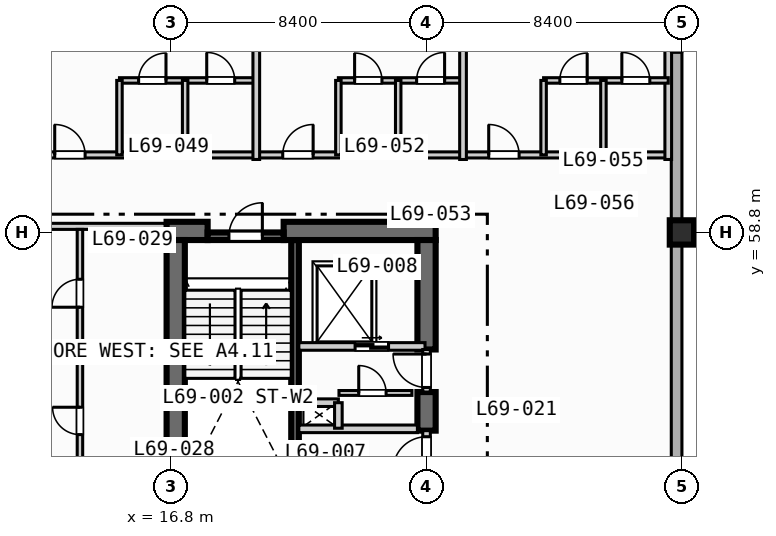
"""IFC4 building model, lengths in metres.
Left out: names, types, materials, properties, quantities, classifications, styles, units other than length and angle.
Written with IfcOpenShell. Run it as: python <this file> out.ifc"""

import sys

from ifc_helpers import new_model, si_unit, direction, frame, frame_2d, origin, origin_2d, place, context, subcontext, project, spatial, rectangle, extrude, element, fill, save


model = new_model("IFC4")
c1 = context("Model", 3, precision=1e-05, world=origin(), true_north=direction((0.0, 1.0)))
c2 = subcontext(c1, "Body", "Model", "MODEL_VIEW")
j1 = project(units=[si_unit("LENGTHUNIT", "METRE"), si_unit("PLANEANGLEUNIT", "RADIAN")], contexts=[c1])
p1 = place(None, origin())
s1 = spatial("IfcSite", under=j1, at=p1, CompositionType="ELEMENT")
p2 = place(p1, origin())
s2 = spatial("IfcBuilding", under=s1, at=p2, CompositionType="ELEMENT")
p3 = place(p2, frame((0.0, 0.0, 278.6)))
s3 = spatial("IfcBuildingStorey", under=s2, at=p3, CompositionType="ELEMENT", Elevation=278.6)
p4 = place(p3, frame((20.875, 50.5, 0.0), z_axis=(0.0, 0.0, 1.0), x_axis=(0.0, 1.0, 0.0)))
e1 = element("IfcWall", 1, at=p4, inside=s3, PredefinedType="SOLIDWALL", context=c2, shape_type="SweptSolid", body=[
    extrude(rectangle(XDim=8.05, YDim=0.25, at=frame_2d((4.025, 0.0))), origin(), (0.0, 0.0, 1.0), 3.47),
])
p5 = place(p3, frame((16.65, 58.85, 0.0), z_axis=(0.0, 0.0, 1.0), x_axis=(1.0, 0.0, 0.0)))
e2 = element("IfcWall", 2, at=p5, inside=s3, PredefinedType="SHEAR", context=c2, shape_type="SweptSolid", body=[
    extrude(rectangle(XDim=1.35, YDim=0.6, at=frame_2d((0.675, 0.0))), origin(), (0.0, 0.0, 1.0), 3.47),
])
p6 = place(p3, frame((20.5, 58.85, 0.0), z_axis=(0.0, 0.0, 1.0), x_axis=(1.0, 0.0, 0.0)))
e3 = element("IfcWall", 3, at=p6, inside=s3, PredefinedType="SHEAR", context=c2, shape_type="SweptSolid", body=[
    extrude(rectangle(XDim=5.0, YDim=0.6, at=frame_2d((2.5, 0.0))), origin(), (0.0, 0.0, 1.0), 3.47),
])
p7 = place(p3, frame((16.95, 42.2, 0.0), z_axis=(0.0, 0.0, 1.0), x_axis=(0.0, 1.0, 0.0)))
e4 = element("IfcWall", 4, at=p7, inside=s3, PredefinedType="SHEAR", context=c2, shape_type="SweptSolid", body=[
    extrude(rectangle(XDim=16.35, YDim=0.6, at=frame_2d((8.175, 0.0))), origin(), (0.0, 0.0, 1.0), 3.47),
])
p8 = place(p3, frame((25.2, 52.28, 0.0), z_axis=(0.0, 0.0, 1.0), x_axis=(0.0, 1.0, 0.0)))
e5 = element("IfcWall", 5, at=p8, inside=s3, PredefinedType="SHEAR", context=c2, shape_type="SweptSolid", body=[
    extrude(rectangle(XDim=1.27, YDim=0.6, at=frame_2d((0.635, 0.0))), origin(), (0.0, 0.0, 1.0), 3.47),
])
p9 = place(p3, frame((25.2, 54.95, 0.0), z_axis=(0.0, 0.0, 1.0), x_axis=(0.0, 1.0, 0.0)))
e6 = element("IfcWall", 6, at=p9, inside=s3, PredefinedType="SHEAR", context=c2, shape_type="SweptSolid", body=[
    extrude(rectangle(XDim=3.6, YDim=0.6, at=frame_2d((1.8, 0.0))), origin(), (0.0, 0.0, 1.0), 3.47),
])
p10 = place(p3, frame((33.6, 58.8, 0.0), z_axis=(0.0, 0.0, 1.0), x_axis=(1.0, 0.0, 0.0)))
e7 = element("IfcColumn", 7, at=p10, inside=s3, PredefinedType="COLUMN", context=c2, shape_type="SweptSolid", body=[
    extrude(rectangle(XDim=0.8, YDim=0.8, at=origin_2d()), origin(), (0.0, 0.0, 1.0), 3.7),
])
p11 = place(p3, frame((33.425, 72.425, 0.0), z_axis=(0.0, 0.0, 1.0), x_axis=(0.0, -1.0, 0.0)))
e8 = element("IfcWall", 8, at=p11, inside=s3, PredefinedType="STANDARD", context=c2, shape_type="SweptSolid", body=[
    extrude(rectangle(XDim=39.0, YDim=0.35, at=frame_2d((19.5, 0.0))), origin(), (0.0, 0.0, 1.0), 3.47),
])
p12 = place(p11, frame((5.9, 0.0, 0.85)))
e9 = element("IfcOpeningElement", 9, at=p12, cuts=e8, PredefinedType="OPENING", context=c2, shape_type="SweptSolid", body=[
    extrude(rectangle(XDim=1.8, YDim=1.8, at=frame_2d((0.9, 0.9))), frame((0.0, 0.185, 0.0), z_axis=(0.0, -1.0, 0.0), x_axis=(1.0, 0.0, 0.0)), (0.0, 0.0, 1.0), 0.37),
])
p13 = place(p3, frame((18.0, 58.675, 0.0), z_axis=(0.0, 0.0, 1.0), x_axis=(1.0, 0.0, 0.0)))
e10 = element("IfcWall", 10, at=p13, inside=s3, PredefinedType="SOLIDWALL", context=c2, shape_type="SweptSolid", body=[
    extrude(rectangle(XDim=2.5, YDim=0.25, at=frame_2d((1.25, 0.0))), origin(), (0.0, 0.0, 1.0), 3.47),
])
p14 = place(p13, frame((0.7, 0.0, 0.0)))
e11 = element("IfcOpeningElement", 11, at=p14, cuts=e10, PredefinedType="OPENING", context=c2, shape_type="SweptSolid", body=[
    extrude(rectangle(XDim=1.1, YDim=2.15, at=frame_2d((0.55, 1.075))), frame((0.0, 0.135, 0.0), z_axis=(0.0, -1.0, 0.0), x_axis=(1.0, 0.0, 0.0)), (0.0, 0.0, 1.0), 0.27),
])
p15 = place(p3, frame((25.2, 50.8, 0.0), z_axis=(0.0, 0.0, 1.0), x_axis=(0.0, 1.0, 0.0)))
e12 = element("IfcWall", 12, at=p15, inside=s3, PredefinedType="SOLIDWALL", context=c2, shape_type="SweptSolid", body=[
    extrude(rectangle(XDim=1.48, YDim=0.25, at=frame_2d((0.74, 0.0))), origin(), (0.0, 0.0, 1.0), 3.47),
])
p16 = place(p15, frame((0.18, 0.0, 0.0)))
e13 = element("IfcOpeningElement", 13, at=p16, cuts=e12, PredefinedType="OPENING", context=c2, shape_type="SweptSolid", body=[
    extrude(rectangle(XDim=1.1, YDim=2.15, at=frame_2d((0.55, 1.075))), frame((0.0, 0.135, 0.0), z_axis=(0.0, -1.0, 0.0), x_axis=(1.0, 0.0, 0.0)), (0.0, 0.0, 1.0), 0.27),
])
p17 = place(p3, frame((21.0, 52.34, 0.0), z_axis=(0.0, 0.0, 1.0), x_axis=(1.0, 0.0, 0.0)))
e14 = element("IfcWall", 14, at=p17, inside=s3, PredefinedType="SOLIDWALL", context=c2, shape_type="SweptSolid", body=[
    extrude(rectangle(XDim=3.9, YDim=0.25, at=frame_2d((1.95, 0.0))), origin(), (0.0, 0.0, 1.0), 3.47),
])
p18 = place(p3, frame((21.0, 55.05, 0.0), z_axis=(0.0, 0.0, 1.0), x_axis=(1.0, 0.0, 0.0)))
e15 = element("IfcWall", 15, at=p18, inside=s3, PredefinedType="SOLIDWALL", context=c2, shape_type="SweptSolid", body=[
    extrude(rectangle(XDim=4.15, YDim=0.25, at=frame_2d((2.075, 0.0))), origin(), (0.0, 0.0, 1.0), 3.47),
])
p19 = place(p18, frame((1.85, 0.0, 0.0)))
e16 = element("IfcOpeningElement", 16, at=p19, cuts=e15, PredefinedType="OPENING", context=c2, shape_type="SweptSolid", body=[
    extrude(rectangle(XDim=1.1, YDim=2.15, at=frame_2d((0.55, 1.075))), frame((0.0, 0.135, 0.0), z_axis=(0.0, -1.0, 0.0), x_axis=(1.0, 0.0, 0.0)), (0.0, 0.0, 1.0), 0.27),
])
p20 = place(p3, frame((25.2, 53.55, 0.0), z_axis=(0.0, 0.0, 1.0), x_axis=(0.0, 1.0, 0.0)))
e17 = element("IfcWall", 17, at=p20, inside=s3, PredefinedType="SOLIDWALL", context=c2, shape_type="SweptSolid", body=[
    extrude(rectangle(XDim=1.4, YDim=0.25, at=frame_2d((0.7, 0.0))), origin(), (0.0, 0.0, 1.0), 3.47),
])
p21 = place(p20, frame((0.15, 0.0, 0.0)))
e18 = element("IfcOpeningElement", 18, at=p21, cuts=e17, PredefinedType="OPENING", context=c2, shape_type="SweptSolid", body=[
    extrude(rectangle(XDim=1.1, YDim=2.15, at=frame_2d((0.55, 1.075))), frame((0.0, 0.135, 0.0), z_axis=(0.0, -1.0, 0.0), x_axis=(1.0, 0.0, 0.0)), (0.0, 0.0, 1.0), 0.27),
])
p22 = place(p3, frame((21.0, 53.2, 0.0), z_axis=(0.0, 0.0, 1.0), x_axis=(1.0, 0.0, 0.0)))
e19 = element("IfcWall", 19, at=p22, inside=s3, PredefinedType="SOLIDWALL", context=c2, shape_type="SweptSolid", body=[
    extrude(rectangle(XDim=1.3, YDim=0.25, at=frame_2d((0.65, 0.0))), origin(), (0.0, 0.0, 1.0), 3.47),
])
p23 = place(p3, frame((22.3, 52.36, 0.0), z_axis=(0.0, 0.0, 1.0), x_axis=(0.0, 1.0, 0.0)))
e20 = element("IfcWall", 20, at=p23, inside=s3, PredefinedType="SOLIDWALL", context=c2, shape_type="SweptSolid", body=[
    extrude(rectangle(XDim=0.84, YDim=0.25, at=frame_2d((0.42, 0.0))), origin(), (0.0, 0.0, 1.0), 3.47),
])
p24 = place(p3, frame((22.32, 53.52, 0.0), z_axis=(0.0, 0.0, 1.0), x_axis=(1.0, 0.0, 0.0)))
e21 = element("IfcWall", 21, at=p24, inside=s3, PredefinedType="PARTITIONING", context=c2, shape_type="SweptSolid", body=[
    extrude(rectangle(XDim=2.4, YDim=0.16, at=frame_2d((1.2, 0.0))), origin(), (0.0, 0.0, 1.0), 3.47),
])
p25 = place(p24, frame((0.65, 0.0, 0.0)))
e22 = element("IfcOpeningElement", 22, at=p25, cuts=e21, PredefinedType="OPENING", context=c2, shape_type="SweptSolid", body=[
    extrude(rectangle(XDim=0.9, YDim=2.1, at=frame_2d((0.45, 1.05))), frame((0.0, 0.09, 0.0), z_axis=(0.0, -1.0, 0.0), x_axis=(1.0, 0.0, 0.0)), (0.0, 0.0, 1.0), 0.18),
])
p26 = place(p3, frame((8.65, 59.0, 0.0), z_axis=(0.0, 0.0, 1.0), x_axis=(1.0, 0.0, 0.0)))
e23 = element("IfcWall", 23, at=p26, inside=s3, PredefinedType="PARTITIONING", context=c2, shape_type="SweptSolid", body=[
    extrude(rectangle(XDim=7.95, YDim=0.2, at=frame_2d((3.975, 0.0))), origin(), (0.0, 0.0, 1.0), 3.116),
])
p27 = place(p26, frame((2.0, 0.0, 0.0)))
e24 = element("IfcOpeningElement", 24, at=p27, cuts=e23, PredefinedType="OPENING", context=c2, shape_type="SweptSolid", body=[
    extrude(rectangle(XDim=1.0, YDim=2.15, at=frame_2d((0.5, 1.075))), frame((0.0, 0.11, 0.0), z_axis=(0.0, -1.0, 0.0), x_axis=(1.0, 0.0, 0.0)), (0.0, 0.0, 1.0), 0.22),
])
p28 = place(p3, frame((13.8, 50.5, 0.0), z_axis=(0.0, 0.0, 1.0), x_axis=(0.0, 1.0, 0.0)))
e25 = element("IfcWall", 25, at=p28, inside=s3, PredefinedType="PLUMBINGWALL", context=c2, shape_type="SweptSolid", body=[
    extrude(rectangle(XDim=8.4, YDim=0.18, at=frame_2d((4.2, 0.0))), origin(), (0.0, 0.0, 1.0), 3.47),
])
p29 = place(p28, frame((1.65, 0.0, 0.0)))
e26 = element("IfcOpeningElement", 26, at=p29, cuts=e25, PredefinedType="OPENING", context=c2, shape_type="SweptSolid", body=[
    extrude(rectangle(XDim=0.9, YDim=2.1, at=frame_2d((0.45, 1.05))), frame((0.0, 0.1, 0.0), z_axis=(0.0, -1.0, 0.0), x_axis=(1.0, 0.0, 0.0)), (0.0, 0.0, 1.0), 0.2),
])
p30 = place(p28, frame((5.84, 0.0, 0.0)))
e27 = element("IfcOpeningElement", 27, at=p30, cuts=e25, PredefinedType="OPENING", context=c2, shape_type="SweptSolid", body=[
    extrude(rectangle(XDim=0.92, YDim=2.1, at=frame_2d((0.46, 1.05))), frame((0.0, 0.1, 0.0), z_axis=(0.0, -1.0, 0.0), x_axis=(1.0, 0.0, 0.0)), (0.0, 0.0, 1.0), 0.2),
])
p31 = place(p3, frame((13.8, 54.7, 0.0), z_axis=(0.0, 0.0, 1.0), x_axis=(1.0, 0.0, 0.0)))
e28 = element("IfcWall", 28, at=p31, inside=s3, PredefinedType="PLUMBINGWALL", context=c2, shape_type="SweptSolid", body=[
    extrude(rectangle(XDim=2.8, YDim=0.18, at=frame_2d((1.4, 0.0))), origin(), (0.0, 0.0, 1.0), 3.47),
])
p32 = place(p3, frame((11.8, 61.35, 0.0), z_axis=(0.0, 0.0, 1.0), x_axis=(1.0, 0.0, 0.0)))
e29 = element("IfcWall", 29, at=p32, inside=s3, PredefinedType="PARTITIONING", context=c2, shape_type="SweptSolid", body=[
    extrude(rectangle(XDim=21.35, YDim=0.2, at=frame_2d((10.675, 0.0))), origin(), (0.0, 0.0, 1.0), 3.47),
])
p33 = place(p32, frame((1.17, 0.0, 0.0)))
e30 = element("IfcOpeningElement", 30, at=p33, cuts=e29, PredefinedType="OPENING", context=c2, shape_type="SweptSolid", body=[
    extrude(rectangle(XDim=1.0, YDim=2.15, at=frame_2d((0.5, 1.075))), frame((0.0, 0.11, 0.0), z_axis=(0.0, -1.0, 0.0), x_axis=(1.0, 0.0, 0.0)), (0.0, 0.0, 1.0), 0.22),
])
p34 = place(p32, frame((8.67, 0.0, 0.0)))
e31 = element("IfcOpeningElement", 31, at=p34, cuts=e29, PredefinedType="OPENING", context=c2, shape_type="SweptSolid", body=[
    extrude(rectangle(XDim=1.0, YDim=2.15, at=frame_2d((0.5, 1.075))), frame((0.0, 0.11, 0.0), z_axis=(0.0, -1.0, 0.0), x_axis=(1.0, 0.0, 0.0)), (0.0, 0.0, 1.0), 0.22),
])
p35 = place(p32, frame((15.445, 0.0, 0.0)))
e32 = element("IfcOpeningElement", 32, at=p35, cuts=e29, PredefinedType="OPENING", context=c2, shape_type="SweptSolid", body=[
    extrude(rectangle(XDim=1.0, YDim=2.15, at=frame_2d((0.5, 1.075))), frame((0.0, 0.11, 0.0), z_axis=(0.0, -1.0, 0.0), x_axis=(1.0, 0.0, 0.0)), (0.0, 0.0, 1.0), 0.22),
])
p36 = place(p3, frame((15.1, 63.8, 0.0), z_axis=(0.0, 0.0, 1.0), x_axis=(1.0, 0.0, 0.0)))
e33 = element("IfcWall", 33, at=p36, inside=s3, PredefinedType="PLUMBINGWALL", context=c2, shape_type="SweptSolid", body=[
    extrude(rectangle(XDim=4.5, YDim=0.18, at=frame_2d((2.25, 0.0))), origin(), (0.0, 0.0, 1.0), 3.47),
])
p37 = place(p36, frame((0.63, 0.0, 0.0)))
e34 = element("IfcOpeningElement", 34, at=p37, cuts=e33, PredefinedType="OPENING", context=c2, shape_type="SweptSolid", body=[
    extrude(rectangle(XDim=0.9, YDim=2.1, at=frame_2d((0.45, 1.05))), frame((0.0, 0.1, 0.0), z_axis=(0.0, -1.0, 0.0), x_axis=(1.0, 0.0, 0.0)), (0.0, 0.0, 1.0), 0.2),
])
p38 = place(p36, frame((2.87, 0.0, 0.0)))
e35 = element("IfcOpeningElement", 35, at=p38, cuts=e33, PredefinedType="OPENING", context=c2, shape_type="SweptSolid", body=[
    extrude(rectangle(XDim=0.92, YDim=2.1, at=frame_2d((0.46, 1.05))), frame((0.0, 0.1, 0.0), z_axis=(0.0, -1.0, 0.0), x_axis=(1.0, 0.0, 0.0)), (0.0, 0.0, 1.0), 0.2),
])
for number, where, z_axis, x_axis in (
    (36, (15.1, 61.35, 0.0), (0.0, 0.0, 1.0), (0.0, 1.0, 0.0)),
    (37, (17.26, 61.35, 0.0), (0.0, 0.0, 1.0), (0.0, 1.0, 0.0)),
):
    element("IfcWall", number, at=place(p3, frame(where, z_axis=z_axis, x_axis=x_axis)), inside=s3, PredefinedType="PLUMBINGWALL", context=c2, shape_type="SweptSolid", body=[
        extrude(rectangle(XDim=2.45, YDim=0.18, at=frame_2d((1.225, 0.0))), origin(), (0.0, 0.0, 1.0), 3.47),
    ])
p39 = place(p3, frame((19.6, 61.2, 0.0), z_axis=(0.0, 0.0, 1.0), x_axis=(0.0, 1.0, 0.0)))
e38 = element("IfcWall", 38, at=p39, inside=s3, PredefinedType="PARTITIONING", context=c2, shape_type="SweptSolid", body=[
    extrude(rectangle(XDim=11.38, YDim=0.22, at=frame_2d((5.69, 0.0))), origin(), (0.0, 0.0, 1.0), 3.47),
])
p40 = place(p3, frame((22.3, 63.8, 0.0), z_axis=(0.0, 0.0, 1.0), x_axis=(1.0, 0.0, 0.0)))
e39 = element("IfcWall", 39, at=p40, inside=s3, PredefinedType="PLUMBINGWALL", context=c2, shape_type="SweptSolid", body=[
    extrude(rectangle(XDim=4.1, YDim=0.18, at=frame_2d((2.05, 0.0))), origin(), (0.0, 0.0, 1.0), 3.47),
])
p41 = place(p40, frame((0.534, 0.0, 0.0)))
e40 = element("IfcOpeningElement", 40, at=p41, cuts=e39, PredefinedType="OPENING", context=c2, shape_type="SweptSolid", body=[
    extrude(rectangle(XDim=0.9, YDim=2.1, at=frame_2d((0.45, 1.05))), frame((0.0, 0.1, 0.0), z_axis=(0.0, -1.0, 0.0), x_axis=(1.0, 0.0, 0.0)), (0.0, 0.0, 1.0), 0.2),
])
p42 = place(p40, frame((2.574, 0.0, 0.0)))
e41 = element("IfcOpeningElement", 41, at=p42, cuts=e39, PredefinedType="OPENING", context=c2, shape_type="SweptSolid", body=[
    extrude(rectangle(XDim=0.92, YDim=2.1, at=frame_2d((0.46, 1.05))), frame((0.0, 0.1, 0.0), z_axis=(0.0, -1.0, 0.0), x_axis=(1.0, 0.0, 0.0)), (0.0, 0.0, 1.0), 0.2),
])
for number, where, z_axis, x_axis in (
    (42, (22.3, 61.35, 0.0), (0.0, 0.0, 1.0), (0.0, 1.0, 0.0)),
    (43, (24.268, 61.35, 0.0), (0.0, 0.0, 1.0), (0.0, 1.0, 0.0)),
):
    element("IfcWall", number, at=place(p3, frame(where, z_axis=z_axis, x_axis=x_axis)), inside=s3, PredefinedType="PLUMBINGWALL", context=c2, shape_type="SweptSolid", body=[
        extrude(rectangle(XDim=2.45, YDim=0.18, at=frame_2d((1.225, 0.0))), origin(), (0.0, 0.0, 1.0), 3.47),
    ])
for number, where, z_axis, x_axis in (
    (44, (26.4, 61.2, 0.0), (0.0, 0.0, 1.0), (0.0, 1.0, 0.0)),
    (45, (33.15, 61.2, 0.0), (0.0, 0.0, 1.0), (0.0, 1.0, 0.0)),
):
    element("IfcWall", number, at=place(p3, frame(where, z_axis=z_axis, x_axis=x_axis)), inside=s3, PredefinedType="PARTITIONING", context=c2, shape_type="SweptSolid", body=[
        extrude(rectangle(XDim=11.38, YDim=0.22, at=frame_2d((5.69, 0.0))), origin(), (0.0, 0.0, 1.0), 3.47),
    ])
p43 = place(p3, frame((29.05, 63.8, 0.0), z_axis=(0.0, 0.0, 1.0), x_axis=(1.0, 0.0, 0.0)))
e46 = element("IfcWall", 46, at=p43, inside=s3, PredefinedType="PLUMBINGWALL", context=c2, shape_type="SweptSolid", body=[
    extrude(rectangle(XDim=4.1, YDim=0.18, at=frame_2d((2.05, 0.0))), origin(), (0.0, 0.0, 1.0), 3.47),
])
p44 = place(p43, frame((0.534, 0.0, 0.0)))
e47 = element("IfcOpeningElement", 47, at=p44, cuts=e46, PredefinedType="OPENING", context=c2, shape_type="SweptSolid", body=[
    extrude(rectangle(XDim=0.9, YDim=2.1, at=frame_2d((0.45, 1.05))), frame((0.0, 0.1, 0.0), z_axis=(0.0, -1.0, 0.0), x_axis=(1.0, 0.0, 0.0)), (0.0, 0.0, 1.0), 0.2),
])
p45 = place(p43, frame((2.574, 0.0, 0.0)))
e48 = element("IfcOpeningElement", 48, at=p45, cuts=e46, PredefinedType="OPENING", context=c2, shape_type="SweptSolid", body=[
    extrude(rectangle(XDim=0.92, YDim=2.1, at=frame_2d((0.46, 1.05))), frame((0.0, 0.1, 0.0), z_axis=(0.0, -1.0, 0.0), x_axis=(1.0, 0.0, 0.0)), (0.0, 0.0, 1.0), 0.2),
])
for number, where, z_axis, x_axis in (
    (49, (29.05, 61.35, 0.0), (0.0, 0.0, 1.0), (0.0, 1.0, 0.0)),
    (50, (31.018, 61.35, 0.0), (0.0, 0.0, 1.0), (0.0, 1.0, 0.0)),
):
    element("IfcWall", number, at=place(p3, frame(where, z_axis=z_axis, x_axis=x_axis)), inside=s3, PredefinedType="PLUMBINGWALL", context=c2, shape_type="SweptSolid", body=[
        extrude(rectangle(XDim=2.45, YDim=0.18, at=frame_2d((1.225, 0.0))), origin(), (0.0, 0.0, 1.0), 3.47),
    ])
p46 = place(p14, origin())
e51 = element("IfcDoor", 51, at=p46, inside=s3, OperationType="SINGLE_SWING_RIGHT", PredefinedType="DOOR", context=c2, shape_type="SweptSolid", body=[
    extrude(rectangle(XDim=1.1, YDim=2.15, at=frame_2d((0.55, 1.075))), frame((0.0, 0.025, 0.0), z_axis=(0.0, -1.0, 0.0), x_axis=(1.0, 0.0, 0.0)), (0.0, 0.0, 1.0), 0.05),
])
fill(e11, e51)
p47 = place(p16, origin())
e52 = element("IfcDoor", 52, at=p47, inside=s3, OperationType="SINGLE_SWING_LEFT", PredefinedType="DOOR", context=c2, shape_type="SweptSolid", body=[
    extrude(rectangle(XDim=1.1, YDim=2.15, at=frame_2d((0.55, 1.075))), frame((0.0, 0.025, 0.0), z_axis=(0.0, -1.0, 0.0), x_axis=(1.0, 0.0, 0.0)), (0.0, 0.0, 1.0), 0.05),
])
fill(e13, e52)
p48 = place(p19, origin())
e53 = element("IfcDoor", 53, at=p48, inside=s3, OperationType="SLIDING_TO_LEFT", PredefinedType="DOOR", context=c2, shape_type="SweptSolid", body=[
    extrude(rectangle(XDim=1.1, YDim=2.15, at=frame_2d((0.55, 1.075))), frame((0.0, 0.025, 0.0), z_axis=(0.0, -1.0, 0.0), x_axis=(1.0, 0.0, 0.0)), (0.0, 0.0, 1.0), 0.05),
])
fill(e16, e53)
p49 = place(p21, origin())
e54 = element("IfcDoor", 54, at=p49, inside=s3, OperationType="SINGLE_SWING_RIGHT", PredefinedType="DOOR", context=c2, shape_type="SweptSolid", body=[
    extrude(rectangle(XDim=1.1, YDim=2.15, at=frame_2d((0.55, 1.075))), frame((0.0, 0.025, 0.0), z_axis=(0.0, -1.0, 0.0), x_axis=(1.0, 0.0, 0.0)), (0.0, 0.0, 1.0), 0.05),
])
fill(e18, e54)
p50 = place(p25, origin())
e55 = element("IfcDoor", 55, at=p50, inside=s3, OperationType="SINGLE_SWING_LEFT", PredefinedType="DOOR", context=c2, shape_type="SweptSolid", body=[
    extrude(rectangle(XDim=0.9, YDim=2.1, at=frame_2d((0.45, 1.05))), frame((0.0, 0.025, 0.0), z_axis=(0.0, -1.0, 0.0), x_axis=(1.0, 0.0, 0.0)), (0.0, 0.0, 1.0), 0.05),
])
fill(e22, e55)
p51 = place(p29, origin())
e56 = element("IfcDoor", 56, at=p51, inside=s3, OperationType="SINGLE_SWING_RIGHT", PredefinedType="DOOR", context=c2, shape_type="SweptSolid", body=[
    extrude(rectangle(XDim=0.9, YDim=2.1, at=frame_2d((0.45, 1.05))), frame((0.0, 0.025, 0.0), z_axis=(0.0, -1.0, 0.0), x_axis=(1.0, 0.0, 0.0)), (0.0, 0.0, 1.0), 0.05),
])
fill(e26, e56)
p52 = place(p30, origin())
e57 = element("IfcDoor", 57, at=p52, inside=s3, OperationType="SINGLE_SWING_LEFT", PredefinedType="DOOR", context=c2, shape_type="SweptSolid", body=[
    extrude(rectangle(XDim=0.92, YDim=2.1, at=frame_2d((0.46, 1.05))), frame((0.0, 0.025, 0.0), z_axis=(0.0, -1.0, 0.0), x_axis=(1.0, 0.0, 0.0)), (0.0, 0.0, 1.0), 0.05),
])
fill(e27, e57)
p53 = place(p33, origin())
e58 = element("IfcDoor", 58, at=p53, inside=s3, OperationType="SINGLE_SWING_LEFT", PredefinedType="DOOR", context=c2, shape_type="SweptSolid", body=[
    extrude(rectangle(XDim=1.0, YDim=2.15, at=frame_2d((0.5, 1.075))), frame((0.0, 0.025, 0.0), z_axis=(0.0, -1.0, 0.0), x_axis=(1.0, 0.0, 0.0)), (0.0, 0.0, 1.0), 0.05),
])
fill(e30, e58)
p54 = place(p34, origin())
e59 = element("IfcDoor", 59, at=p54, inside=s3, OperationType="SINGLE_SWING_RIGHT", PredefinedType="DOOR", context=c2, shape_type="SweptSolid", body=[
    extrude(rectangle(XDim=1.0, YDim=2.15, at=frame_2d((0.5, 1.075))), frame((0.0, 0.025, 0.0), z_axis=(0.0, -1.0, 0.0), x_axis=(1.0, 0.0, 0.0)), (0.0, 0.0, 1.0), 0.05),
])
fill(e31, e59)
p55 = place(p35, origin())
e60 = element("IfcDoor", 60, at=p55, inside=s3, OperationType="SINGLE_SWING_LEFT", PredefinedType="DOOR", context=c2, shape_type="SweptSolid", body=[
    extrude(rectangle(XDim=1.0, YDim=2.15, at=frame_2d((0.5, 1.075))), frame((0.0, 0.025, 0.0), z_axis=(0.0, -1.0, 0.0), x_axis=(1.0, 0.0, 0.0)), (0.0, 0.0, 1.0), 0.05),
])
fill(e32, e60)
p56 = place(p37, origin())
e61 = element("IfcDoor", 61, at=p56, inside=s3, OperationType="SINGLE_SWING_RIGHT", PredefinedType="DOOR", context=c2, shape_type="SweptSolid", body=[
    extrude(rectangle(XDim=0.9, YDim=2.1, at=frame_2d((0.45, 1.05))), frame((0.0, 0.025, 0.0), z_axis=(0.0, -1.0, 0.0), x_axis=(1.0, 0.0, 0.0)), (0.0, 0.0, 1.0), 0.05),
])
fill(e34, e61)
p57 = place(p38, origin())
e62 = element("IfcDoor", 62, at=p57, inside=s3, OperationType="SINGLE_SWING_LEFT", PredefinedType="DOOR", context=c2, shape_type="SweptSolid", body=[
    extrude(rectangle(XDim=0.92, YDim=2.1, at=frame_2d((0.46, 1.05))), frame((0.0, 0.025, 0.0), z_axis=(0.0, -1.0, 0.0), x_axis=(1.0, 0.0, 0.0)), (0.0, 0.0, 1.0), 0.05),
])
fill(e35, e62)
p58 = place(p41, origin())
e63 = element("IfcDoor", 63, at=p58, inside=s3, OperationType="SINGLE_SWING_LEFT", PredefinedType="DOOR", context=c2, shape_type="SweptSolid", body=[
    extrude(rectangle(XDim=0.9, YDim=2.1, at=frame_2d((0.45, 1.05))), frame((0.0, 0.025, 0.0), z_axis=(0.0, -1.0, 0.0), x_axis=(1.0, 0.0, 0.0)), (0.0, 0.0, 1.0), 0.05),
])
fill(e40, e63)
p59 = place(p42, origin())
e64 = element("IfcDoor", 64, at=p59, inside=s3, OperationType="SINGLE_SWING_RIGHT", PredefinedType="DOOR", context=c2, shape_type="SweptSolid", body=[
    extrude(rectangle(XDim=0.92, YDim=2.1, at=frame_2d((0.46, 1.05))), frame((0.0, 0.025, 0.0), z_axis=(0.0, -1.0, 0.0), x_axis=(1.0, 0.0, 0.0)), (0.0, 0.0, 1.0), 0.05),
])
fill(e41, e64)
p60 = place(p44, origin())
e65 = element("IfcDoor", 65, at=p60, inside=s3, OperationType="SINGLE_SWING_RIGHT", PredefinedType="DOOR", context=c2, shape_type="SweptSolid", body=[
    extrude(rectangle(XDim=0.9, YDim=2.1, at=frame_2d((0.45, 1.05))), frame((0.0, 0.025, 0.0), z_axis=(0.0, -1.0, 0.0), x_axis=(1.0, 0.0, 0.0)), (0.0, 0.0, 1.0), 0.05),
])
fill(e47, e65)
p61 = place(p45, origin())
e66 = element("IfcDoor", 66, at=p61, inside=s3, OperationType="SINGLE_SWING_LEFT", PredefinedType="DOOR", context=c2, shape_type="SweptSolid", body=[
    extrude(rectangle(XDim=0.92, YDim=2.1, at=frame_2d((0.46, 1.05))), frame((0.0, 0.025, 0.0), z_axis=(0.0, -1.0, 0.0), x_axis=(1.0, 0.0, 0.0)), (0.0, 0.0, 1.0), 0.05),
])
fill(e48, e66)
save(model, sys.argv[1])
